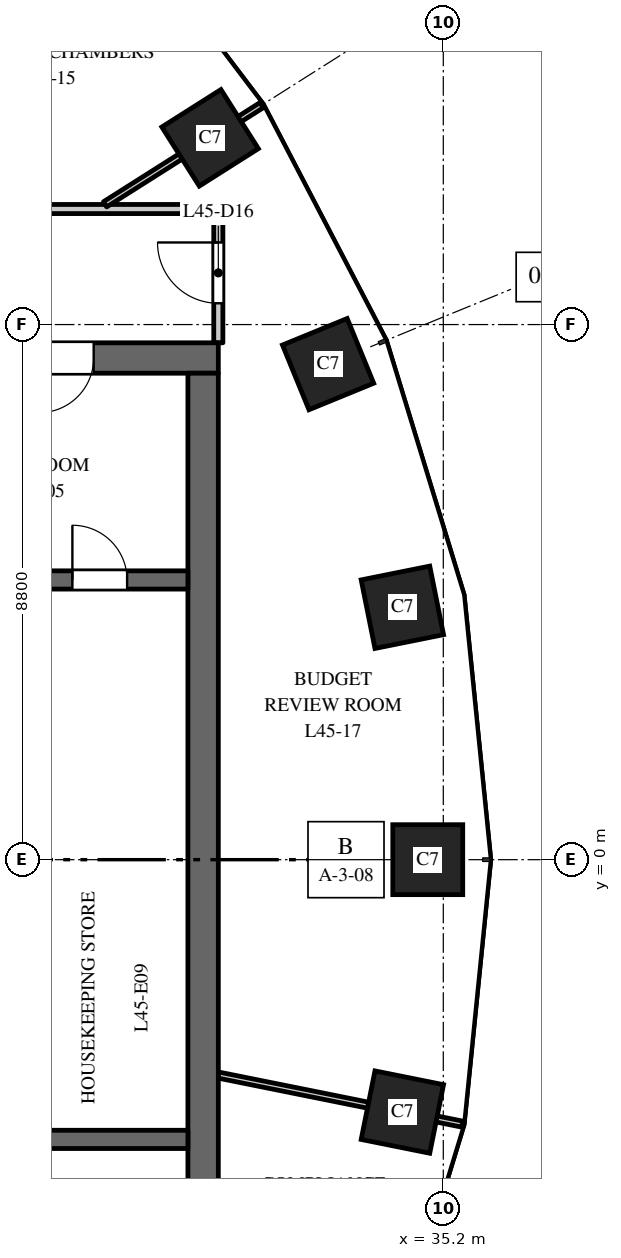
"""IFC4 building model, lengths in metres.
Left out: names, types, materials, properties, quantities, classifications, styles, units other than length and angle.
Written with IfcOpenShell. Run it as: python <this file> out.ifc"""

import sys

from ifc_helpers import new_model, si_unit, direction, frame, frame_2d, origin, origin_2d, place, context, subcontext, project, spatial, rectangle, extrude, element, fill, save


model = new_model("IFC4")
c1 = context("Model", 3, precision=1e-05, world=origin(), true_north=direction((0.0, 1.0)))
c2 = subcontext(c1, "Body", "Model", "MODEL_VIEW")
j1 = project(units=[si_unit("LENGTHUNIT", "METRE"), si_unit("PLANEANGLEUNIT", "RADIAN")], contexts=[c1])
p1 = place(None, origin())
s1 = spatial("IfcSite", under=j1, at=p1, CompositionType="ELEMENT")
p2 = place(p1, origin())
s2 = spatial("IfcBuilding", under=s1, at=p2, CompositionType="ELEMENT")
p3 = place(p2, frame((0.0, 0.0, 194.0)))
s3 = spatial("IfcBuildingStorey", under=s2, at=p3, CompositionType="ELEMENT", Elevation=194.0)
for number, where, z_axis, x_axis in (
    (1, (34.945, 0.0, 0.0), (0.0, 0.0, 1.0), (0.0, 1.0, 0.0)),
    (2, (34.527, 4.151, 0.0), (0.0, 0.0, 1.0), (-0.197, 0.98, 0.0)),
    (3, (33.305, 8.149, 0.0), (0.0, 0.0, 1.0), (-0.379, 0.925, 0.0)),
    (4, (31.365, 11.871, 0.0), (0.0, 0.0, 1.0), (-0.535, 0.845, 0.0)),
    (5, (34.527, -4.151, 0.0), (0.0, 0.0, 1.0), (0.197, 0.98, 0.0)),
):
    element("IfcColumn", number, at=place(p3, frame(where, z_axis=z_axis, x_axis=x_axis)), inside=s3, PredefinedType="COLUMN", context=c2, shape_type="SweptSolid", body=[
        extrude(rectangle(XDim=1.15, YDim=1.15, at=origin_2d()), origin(), (0.0, 0.0, 1.0), 4.0),
    ])
p4 = place(p3, frame((16.5, 8.25, 0.0), z_axis=(0.0, 0.0, 1.0), x_axis=(1.0, 0.0, 0.0)))
e6 = element("IfcWall", 6, at=p4, inside=s3, PredefinedType="SHEAR", context=c2, shape_type="SweptSolid", body=[
    extrude(rectangle(XDim=15.0, YDim=0.5, at=frame_2d((7.5, 0.0))), origin(), (0.0, 0.0, 1.0), 3.7),
])
p5 = place(p4, frame((6.9, 0.0, 0.0)))
e7 = element("IfcOpeningElement", 7, at=p5, cuts=e6, PredefinedType="OPENING", context=c2, shape_type="SweptSolid", body=[
    extrude(rectangle(XDim=1.2, YDim=2.1, at=frame_2d((0.6, 1.05))), frame((0.0, 0.26, 0.0), z_axis=(0.0, -1.0, 0.0), x_axis=(1.0, 0.0, 0.0)), (0.0, 0.0, 1.0), 0.52),
])
p6 = place(p4, frame((12.05, 0.0, 0.0)))
e8 = element("IfcOpeningElement", 8, at=p6, cuts=e6, PredefinedType="OPENING", context=c2, shape_type="SweptSolid", body=[
    extrude(rectangle(XDim=0.9, YDim=2.1, at=frame_2d((0.45, 1.05))), frame((0.0, 0.26, 0.0), z_axis=(0.0, -1.0, 0.0), x_axis=(1.0, 0.0, 0.0)), (0.0, 0.0, 1.0), 0.52),
])
p7 = place(p3, frame((31.25, -8.0, 0.0), z_axis=(0.0, 0.0, 1.0), x_axis=(0.0, 1.0, 0.0)))
e9 = element("IfcWall", 9, at=p7, inside=s3, PredefinedType="SHEAR", context=c2, shape_type="SweptSolid", body=[
    extrude(rectangle(XDim=16.0, YDim=0.5, at=frame_2d((8.0, 0.0))), origin(), (0.0, 0.0, 1.0), 3.7),
])
p8 = place(p3, frame((24.9, 4.6, 0.0), z_axis=(0.0, 0.0, 1.0), x_axis=(1.0, 0.0, 0.0)))
e10 = element("IfcWall", 10, at=p8, inside=s3, PredefinedType="SHEAR", context=c2, shape_type="SweptSolid", body=[
    extrude(rectangle(XDim=6.1, YDim=0.3, at=frame_2d((3.05, 0.0))), origin(), (0.0, 0.0, 1.0), 3.7),
])
p9 = place(p8, frame((4.2, 0.0, 0.0)))
e11 = element("IfcOpeningElement", 11, at=p9, cuts=e10, PredefinedType="OPENING", context=c2, shape_type="SweptSolid", body=[
    extrude(rectangle(XDim=0.9, YDim=2.1, at=frame_2d((0.45, 1.05))), frame((0.0, 0.16, 0.0), z_axis=(0.0, -1.0, 0.0), x_axis=(1.0, 0.0, 0.0)), (0.0, 0.0, 1.0), 0.32),
])
p10 = place(p3, frame((24.9, -4.6, 0.0), z_axis=(0.0, 0.0, 1.0), x_axis=(1.0, 0.0, 0.0)))
e12 = element("IfcWall", 12, at=p10, inside=s3, PredefinedType="SHEAR", context=c2, shape_type="SweptSolid", body=[
    extrude(rectangle(XDim=6.1, YDim=0.3, at=frame_2d((3.05, 0.0))), origin(), (0.0, 0.0, 1.0), 3.7),
])
p11 = place(p3, frame((23.623, 10.7, 0.0), z_axis=(0.0, 0.0, 1.0), x_axis=(1.0, 0.0, 0.0)))
e13 = element("IfcWall", 13, at=p11, inside=s3, PredefinedType="PARTITIONING", context=c2, shape_type="SweptSolid", body=[
    extrude(rectangle(XDim=7.877, YDim=0.15, at=frame_2d((3.938, 0.0))), origin(), (0.0, 0.0, 1.0), 2.9),
])
p12 = place(p11, frame((0.498, 0.0, 0.0)))
e14 = element("IfcOpeningElement", 14, at=p12, cuts=e13, PredefinedType="OPENING", context=c2, shape_type="SweptSolid", body=[
    extrude(rectangle(XDim=1.0, YDim=2.1, at=frame_2d((0.5, 1.05))), frame((0.0, 0.085, 0.0), z_axis=(0.0, -1.0, 0.0), x_axis=(1.0, 0.0, 0.0)), (0.0, 0.0, 1.0), 0.17),
])
p13 = place(p3, frame((29.637, 10.777, 0.0), z_axis=(0.0, 0.0, 1.0), x_axis=(0.844810627195, 0.535065420467, 0.0)))
e15 = element("IfcWall", 15, at=p13, inside=s3, PredefinedType="PARTITIONING", context=c2, shape_type="SweptSolid", body=[
    extrude(rectangle(XDim=3.048, YDim=0.1, at=frame_2d((1.524, 0.0))), origin(), (0.0, 0.0, 1.0), 2.9),
])
p14 = place(p3, frame((31.5, -3.542, 0.0), z_axis=(0.0, 0.0, 1.0), x_axis=(0.980357474535, -0.197228857227, 0.0)))
e16 = element("IfcWall", 16, at=p14, inside=s3, PredefinedType="PARTITIONING", context=c2, shape_type="SweptSolid", body=[
    extrude(rectangle(XDim=4.092, YDim=0.1, at=frame_2d((2.046, 0.0))), origin(), (0.0, 0.0, 1.0), 2.9),
])
p15 = place(p3, frame((31.5, 8.5, 0.0), z_axis=(0.0, 0.0, 1.0), x_axis=(0.0, 1.0, 0.0)))
e17 = element("IfcWall", 17, at=p15, inside=s3, PredefinedType="PARTITIONING", context=c2, shape_type="SweptSolid", body=[
    extrude(rectangle(XDim=2.2, YDim=0.15, at=frame_2d((1.1, 0.0))), origin(), (0.0, 0.0, 1.0), 2.9),
])
p16 = place(p15, frame((0.65, 0.0, 0.0)))
e18 = element("IfcOpeningElement", 18, at=p16, cuts=e17, PredefinedType="OPENING", context=c2, shape_type="SweptSolid", body=[
    extrude(rectangle(XDim=1.0, YDim=2.1, at=frame_2d((0.5, 1.05))), frame((0.0, 0.085, 0.0), z_axis=(0.0, -1.0, 0.0), x_axis=(1.0, 0.0, 0.0)), (0.0, 0.0, 1.0), 0.17),
])
p17 = place(p6, origin())
e19 = element("IfcDoor", 19, at=p17, inside=s3, OperationType="SINGLE_SWING_LEFT", PredefinedType="DOOR", context=c2, shape_type="SweptSolid", body=[
    extrude(rectangle(XDim=0.9, YDim=2.1, at=frame_2d((0.45, 1.05))), frame((0.0, 0.025, 0.0), z_axis=(0.0, -1.0, 0.0), x_axis=(1.0, 0.0, 0.0)), (0.0, 0.0, 1.0), 0.05),
])
fill(e8, e19)
p18 = place(p9, origin())
e20 = element("IfcDoor", 20, at=p18, inside=s3, OperationType="SINGLE_SWING_RIGHT", PredefinedType="DOOR", context=c2, shape_type="SweptSolid", body=[
    extrude(rectangle(XDim=0.9, YDim=2.1, at=frame_2d((0.45, 1.05))), frame((0.0, 0.025, 0.0), z_axis=(0.0, -1.0, 0.0), x_axis=(1.0, 0.0, 0.0)), (0.0, 0.0, 1.0), 0.05),
])
fill(e11, e20)
p19 = place(p16, origin())
e21 = element("IfcDoor", 21, at=p19, inside=s3, OperationType="SINGLE_SWING_RIGHT", PredefinedType="DOOR", context=c2, shape_type="SweptSolid", body=[
    extrude(rectangle(XDim=1.0, YDim=2.1, at=frame_2d((0.5, 1.05))), frame((0.0, 0.025, 0.0), z_axis=(0.0, -1.0, 0.0), x_axis=(1.0, 0.0, 0.0)), (0.0, 0.0, 1.0), 0.05),
])
fill(e18, e21)
save(model, sys.argv[1])
